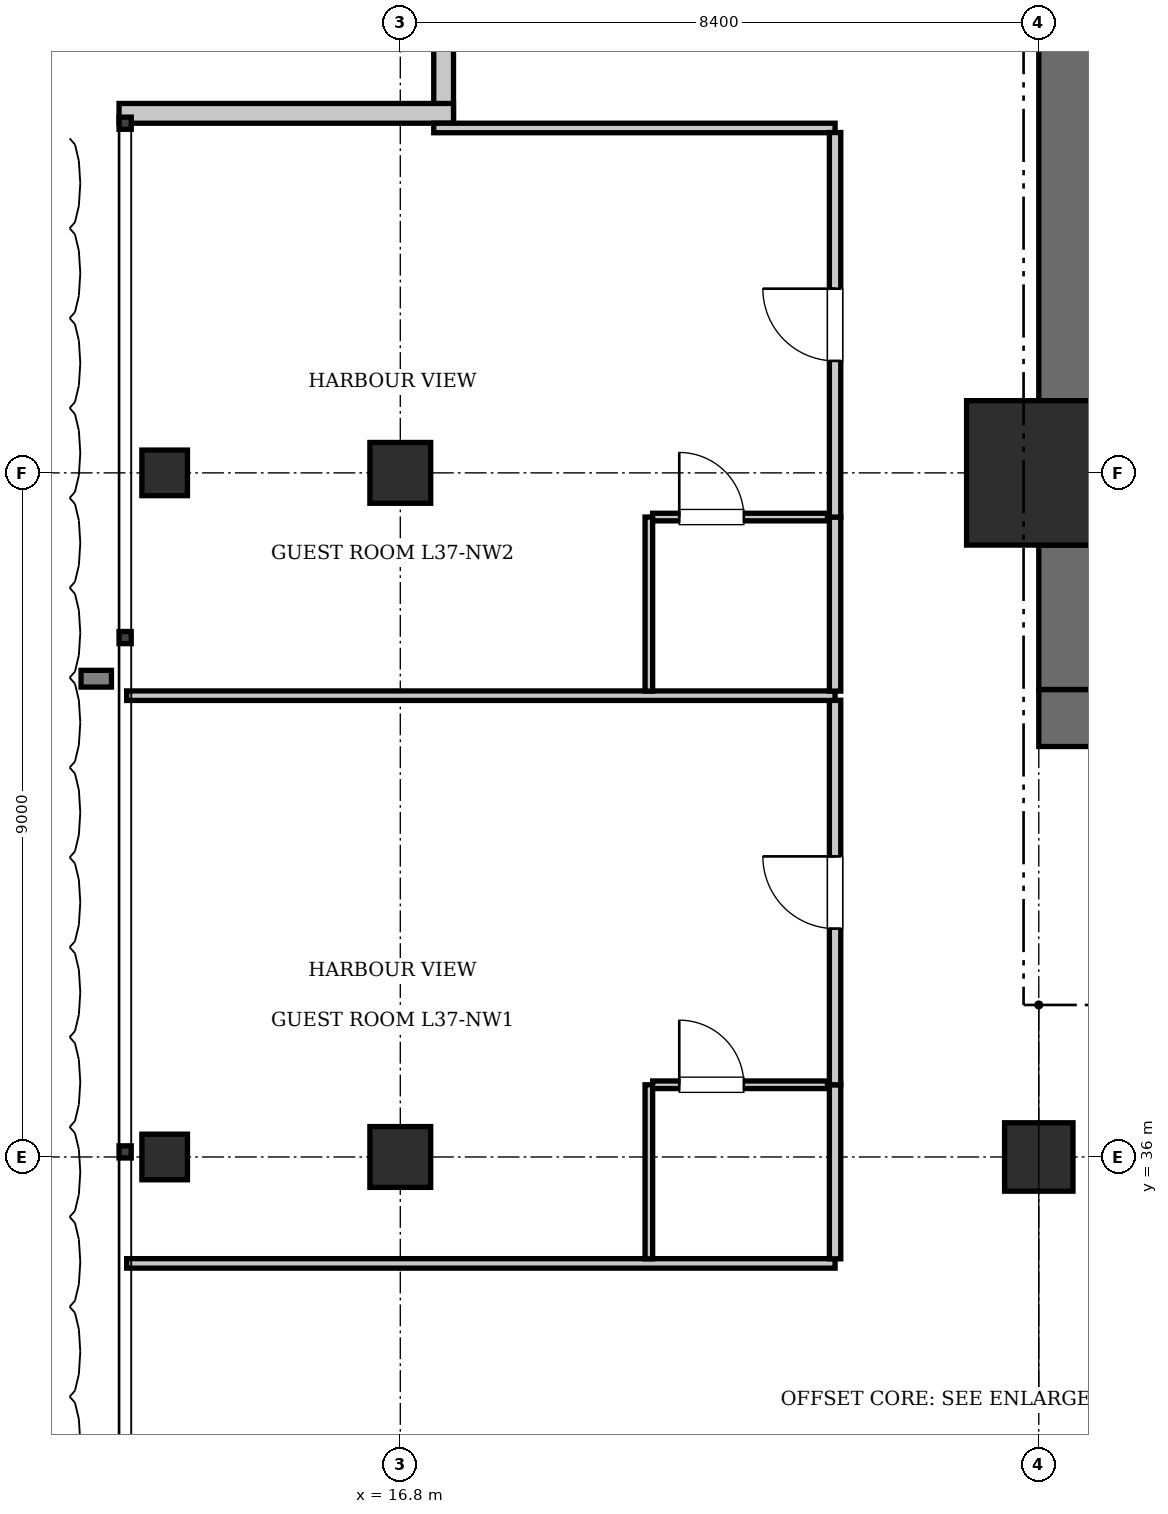
"""IFC4 building model, lengths in metres.
Left out: names, types, materials, properties, quantities, classifications, styles, units other than length and angle.
Written with IfcOpenShell. Run it as: python <this file> out.ifc"""

import sys

from ifc_helpers import new_model, si_unit, direction, frame, frame_2d, origin, origin_2d, place, context, subcontext, project, spatial, rectangle, i_section, extrude, element, fill, save


model = new_model("IFC4")
c1 = context("Model", 3, precision=1e-05, world=origin(), true_north=direction((0.0, 1.0)))
c2 = subcontext(c1, "Body", "Model", "MODEL_VIEW")
j1 = project(units=[si_unit("LENGTHUNIT", "METRE"), si_unit("PLANEANGLEUNIT", "RADIAN")], contexts=[c1])
p1 = place(None, origin())
s1 = spatial("IfcSite", under=j1, at=p1, CompositionType="ELEMENT")
p2 = place(p1, origin())
s2 = spatial("IfcBuilding", under=s1, at=p2, CompositionType="ELEMENT")
p3 = place(p2, frame((0.0, 0.0, 154.35)))
s3 = spatial("IfcBuildingStorey", under=s2, at=p3, CompositionType="ELEMENT", Elevation=154.35)
p4 = place(p3, frame((25.2, 45.0, 0.0), z_axis=(0.0, 0.0, 1.0), x_axis=(1.0, 0.0, 0.0)))
e1 = element("IfcColumn", 1, at=p4, inside=s3, PredefinedType="COLUMN", context=c2, shape_type="SweptSolid", body=[
    extrude(rectangle(XDim=1.9, YDim=1.9, at=origin_2d()), origin(), (0.0, 0.0, 1.0), 3.85),
])
p5 = place(p3, frame((25.2, 41.775, 0.0), z_axis=(0.0, 0.0, 1.0), x_axis=(1.0, 0.0, 0.0)))
e2 = element("IfcWall", 2, at=p5, inside=s3, PredefinedType="SHEAR", context=c2, shape_type="SweptSolid", body=[
    extrude(rectangle(XDim=6.8, YDim=0.75, at=frame_2d((3.4, 0.0))), origin(), (0.0, 0.0, 1.0), 3.85),
])
p6 = place(p5, frame((1.65, 0.0, 0.0)))
e3 = element("IfcOpeningElement", 3, at=p6, cuts=e2, PredefinedType="OPENING", context=c2, shape_type="SweptSolid", body=[
    extrude(rectangle(XDim=1.15, YDim=2.15, at=frame_2d((0.575, 1.075))), frame((0.0, 0.385, 0.0), z_axis=(0.0, -1.0, 0.0), x_axis=(1.0, 0.0, 0.0)), (0.0, 0.0, 1.0), 0.77),
])
p7 = place(p5, frame((5.15, 0.0, 0.0)))
e4 = element("IfcOpeningElement", 4, at=p7, cuts=e2, PredefinedType="OPENING", context=c2, shape_type="SweptSolid", body=[
    extrude(rectangle(XDim=1.1, YDim=2.2, at=frame_2d((0.55, 1.1))), frame((0.0, 0.385, 0.0), z_axis=(0.0, -1.0, 0.0), x_axis=(1.0, 0.0, 0.0)), (0.0, 0.0, 1.0), 0.77),
])
p8 = place(p3, frame((25.575, 42.15, 0.0), z_axis=(0.0, 0.0, 1.0), x_axis=(0.0, 1.0, 0.0)))
e5 = element("IfcWall", 5, at=p8, inside=s3, PredefinedType="SHEAR", context=c2, shape_type="SweptSolid", body=[
    extrude(rectangle(XDim=1.9, YDim=0.75, at=frame_2d((0.95, 0.0))), origin(), (0.0, 0.0, 1.0), 3.85),
])
p9 = place(p3, frame((25.575, 45.95, 0.0), z_axis=(0.0, 0.0, 1.0), x_axis=(0.0, 1.0, 0.0)))
e6 = element("IfcWall", 6, at=p9, inside=s3, PredefinedType="SHEAR", context=c2, shape_type="SweptSolid", body=[
    extrude(rectangle(XDim=7.3, YDim=0.75, at=frame_2d((3.65, 0.0))), origin(), (0.0, 0.0, 1.0), 3.85),
])
p10 = place(p3, frame((25.2, 36.0, 0.0), z_axis=(0.0, 0.0, 1.0), x_axis=(1.0, 0.0, 0.0)))
e7 = element("IfcColumn", 7, at=p10, inside=s3, PredefinedType="COLUMN", context=c2, shape_type="SweptSolid", body=[
    extrude(rectangle(XDim=0.9, YDim=0.9, at=origin_2d()), origin(), (0.0, 0.0, 1.0), 3.85),
])
for number, where, z_axis, x_axis in (
    (8, (16.8, 36.0, 0.0), (0.0, 0.0, 1.0), (1.0, 0.0, 0.0)),
    (9, (16.8, 45.0, 0.0), (0.0, 0.0, 1.0), (1.0, 0.0, 0.0)),
):
    element("IfcColumn", number, at=place(p3, frame(where, z_axis=z_axis, x_axis=x_axis)), inside=s3, PredefinedType="COLUMN", context=c2, shape_type="SweptSolid", body=[
        extrude(rectangle(XDim=0.8, YDim=0.8, at=origin_2d()), origin(), (0.0, 0.0, 1.0), 3.85),
    ])
for number, where, z_axis, x_axis in (
    (10, (13.7, 36.0, 0.0), (0.0, 0.0, 1.0), (1.0, 0.0, 0.0)),
    (11, (13.7, 45.0, 0.0), (0.0, 0.0, 1.0), (1.0, 0.0, 0.0)),
):
    element("IfcColumn", number, at=place(p3, frame(where, z_axis=z_axis, x_axis=x_axis)), inside=s3, PredefinedType="COLUMN", context=c2, shape_type="SweptSolid", body=[
        extrude(i_section(OverallWidth=0.6, OverallDepth=0.6, WebThickness=0.025, FlangeThickness=0.038, at=origin_2d()), origin(), (0.0, 0.0, 1.0), 3.85),
    ])
for number, where, z_axis, x_axis in (
    (12, (17.37, 49.6, 0.0), (0.0, 0.0, 1.0), (0.0, 1.0, 0.0)),
    (13, (13.1, 49.73, 0.0), (0.0, 0.0, 1.0), (1.0, 0.0, 0.0)),
):
    element("IfcWall", number, at=place(p3, frame(where, z_axis=z_axis, x_axis=x_axis)), inside=s3, PredefinedType="SOLIDWALL", context=c2, shape_type="SweptSolid", body=[
        extrude(rectangle(XDim=4.4, YDim=0.26, at=frame_2d((2.2, 0.0))), origin(), (0.0, 0.0, 1.0), 3.61),
    ])
p11 = place(p3, frame((13.2, 34.6, 0.0), z_axis=(0.0, 0.0, 1.0), x_axis=(1.0, 0.0, 0.0)))
e14 = element("IfcWall", 14, at=p11, inside=s3, PredefinedType="PARTITIONING", context=c2, shape_type="SweptSolid", body=[
    extrude(rectangle(XDim=9.32, YDim=0.125, at=frame_2d((4.66, 0.0))), origin(), (0.0, 0.0, 1.0), 3.61),
])
p12 = place(p3, frame((17.24, 49.538, 0.0), z_axis=(0.0, 0.0, 1.0), x_axis=(1.0, 0.0, 0.0)))
e15 = element("IfcWall", 15, at=p12, inside=s3, PredefinedType="PARTITIONING", context=c2, shape_type="SweptSolid", body=[
    extrude(rectangle(XDim=5.28, YDim=0.125, at=frame_2d((2.64, 0.0))), origin(), (0.0, 0.0, 1.0), 3.61),
])
p13 = place(p3, frame((22.52, 34.66, 0.0), z_axis=(0.0, 0.0, 1.0), x_axis=(0.0, 1.0, 0.0)))
e16 = element("IfcWall", 16, at=p13, inside=s3, PredefinedType="PARTITIONING", context=c2, shape_type="SweptSolid", body=[
    extrude(rectangle(XDim=2.29, YDim=0.15, at=frame_2d((1.145, 0.0))), origin(), (0.0, 0.0, 1.0), 3.61),
])
p14 = place(p3, frame((22.52, 36.95, 0.0), z_axis=(0.0, 0.0, 1.0), x_axis=(0.0, 1.0, 0.0)))
e17 = element("IfcWall", 17, at=p14, inside=s3, PredefinedType="PARTITIONING", context=c2, shape_type="SweptSolid", body=[
    extrude(rectangle(XDim=5.059, YDim=0.15, at=frame_2d((2.529, 0.0))), origin(), (0.0, 0.0, 1.0), 3.61),
])
p15 = place(p14, frame((2.054, 0.0, 0.0)))
e18 = element("IfcOpeningElement", 18, at=p15, cuts=e17, PredefinedType="OPENING", context=c2, shape_type="SweptSolid", body=[
    extrude(rectangle(XDim=0.95, YDim=2.15, at=frame_2d((0.475, 1.075))), frame((0.0, 0.085, 0.0), z_axis=(0.0, -1.0, 0.0), x_axis=(1.0, 0.0, 0.0)), (0.0, 0.0, 1.0), 0.17),
])
p16 = place(p3, frame((20.07, 34.66, 0.0), z_axis=(0.0, 0.0, 1.0), x_axis=(0.0, 1.0, 0.0)))
e19 = element("IfcWall", 19, at=p16, inside=s3, PredefinedType="PARTITIONING", context=c2, shape_type="SweptSolid", body=[
    extrude(rectangle(XDim=2.29, YDim=0.1, at=frame_2d((1.145, 0.0))), origin(), (0.0, 0.0, 1.0), 3.61),
])
p17 = place(p3, frame((20.12, 36.95, 0.0), z_axis=(0.0, 0.0, 1.0), x_axis=(1.0, 0.0, 0.0)))
e20 = element("IfcWall", 20, at=p17, inside=s3, PredefinedType="PARTITIONING", context=c2, shape_type="SweptSolid", body=[
    extrude(rectangle(XDim=2.3, YDim=0.1, at=frame_2d((1.15, 0.0))), origin(), (0.0, 0.0, 1.0), 3.61),
])
p18 = place(p17, frame((0.35, 0.0, 0.0)))
e21 = element("IfcOpeningElement", 21, at=p18, cuts=e20, PredefinedType="OPENING", context=c2, shape_type="SweptSolid", body=[
    extrude(rectangle(XDim=0.85, YDim=2.1, at=frame_2d((0.425, 1.05))), frame((0.0, 0.06, 0.0), z_axis=(0.0, -1.0, 0.0), x_axis=(1.0, 0.0, 0.0)), (0.0, 0.0, 1.0), 0.12),
])
p19 = place(p3, frame((13.2, 42.069, 0.0), z_axis=(0.0, 0.0, 1.0), x_axis=(1.0, 0.0, 0.0)))
e22 = element("IfcWall", 22, at=p19, inside=s3, PredefinedType="PARTITIONING", context=c2, shape_type="SweptSolid", body=[
    extrude(rectangle(XDim=9.32, YDim=0.125, at=frame_2d((4.66, 0.0))), origin(), (0.0, 0.0, 1.0), 3.61),
])
p20 = place(p3, frame((22.52, 42.129, 0.0), z_axis=(0.0, 0.0, 1.0), x_axis=(0.0, 1.0, 0.0)))
e23 = element("IfcWall", 23, at=p20, inside=s3, PredefinedType="PARTITIONING", context=c2, shape_type="SweptSolid", body=[
    extrude(rectangle(XDim=2.29, YDim=0.15, at=frame_2d((1.145, 0.0))), origin(), (0.0, 0.0, 1.0), 3.61),
])
p21 = place(p3, frame((22.52, 44.419, 0.0), z_axis=(0.0, 0.0, 1.0), x_axis=(0.0, 1.0, 0.0)))
e24 = element("IfcWall", 24, at=p21, inside=s3, PredefinedType="PARTITIONING", context=c2, shape_type="SweptSolid", body=[
    extrude(rectangle(XDim=5.059, YDim=0.15, at=frame_2d((2.529, 0.0))), origin(), (0.0, 0.0, 1.0), 3.61),
])
p22 = place(p21, frame((2.054, 0.0, 0.0)))
e25 = element("IfcOpeningElement", 25, at=p22, cuts=e24, PredefinedType="OPENING", context=c2, shape_type="SweptSolid", body=[
    extrude(rectangle(XDim=0.95, YDim=2.15, at=frame_2d((0.475, 1.075))), frame((0.0, 0.085, 0.0), z_axis=(0.0, -1.0, 0.0), x_axis=(1.0, 0.0, 0.0)), (0.0, 0.0, 1.0), 0.17),
])
p23 = place(p3, frame((20.07, 42.129, 0.0), z_axis=(0.0, 0.0, 1.0), x_axis=(0.0, 1.0, 0.0)))
e26 = element("IfcWall", 26, at=p23, inside=s3, PredefinedType="PARTITIONING", context=c2, shape_type="SweptSolid", body=[
    extrude(rectangle(XDim=2.29, YDim=0.1, at=frame_2d((1.145, 0.0))), origin(), (0.0, 0.0, 1.0), 3.61),
])
p24 = place(p3, frame((20.12, 44.419, 0.0), z_axis=(0.0, 0.0, 1.0), x_axis=(1.0, 0.0, 0.0)))
e27 = element("IfcWall", 27, at=p24, inside=s3, PredefinedType="PARTITIONING", context=c2, shape_type="SweptSolid", body=[
    extrude(rectangle(XDim=2.3, YDim=0.1, at=frame_2d((1.15, 0.0))), origin(), (0.0, 0.0, 1.0), 3.61),
])
p25 = place(p24, frame((0.35, 0.0, 0.0)))
e28 = element("IfcOpeningElement", 28, at=p25, cuts=e27, PredefinedType="OPENING", context=c2, shape_type="SweptSolid", body=[
    extrude(rectangle(XDim=0.85, YDim=2.1, at=frame_2d((0.425, 1.05))), frame((0.0, 0.06, 0.0), z_axis=(0.0, -1.0, 0.0), x_axis=(1.0, 0.0, 0.0)), (0.0, 0.0, 1.0), 0.12),
])
p26 = place(p18, origin())
e29 = element("IfcDoor", 29, at=p26, inside=s3, OperationType="SINGLE_SWING_LEFT", PredefinedType="DOOR", context=c2, shape_type="SweptSolid", body=[
    extrude(rectangle(XDim=0.85, YDim=2.1, at=frame_2d((0.425, 1.05))), frame((0.0, 0.025, 0.0), z_axis=(0.0, -1.0, 0.0), x_axis=(1.0, 0.0, 0.0)), (0.0, 0.0, 1.0), 0.05),
])
fill(e21, e29)
p27 = place(p15, origin())
e30 = element("IfcDoor", 30, at=p27, inside=s3, OperationType="SINGLE_SWING_RIGHT", PredefinedType="DOOR", context=c2, shape_type="SweptSolid", body=[
    extrude(rectangle(XDim=0.95, YDim=2.15, at=frame_2d((0.475, 1.075))), frame((0.0, 0.025, 0.0), z_axis=(0.0, -1.0, 0.0), x_axis=(1.0, 0.0, 0.0)), (0.0, 0.0, 1.0), 0.05),
])
fill(e18, e30)
p28 = place(p25, origin())
e31 = element("IfcDoor", 31, at=p28, inside=s3, OperationType="SINGLE_SWING_LEFT", PredefinedType="DOOR", context=c2, shape_type="SweptSolid", body=[
    extrude(rectangle(XDim=0.85, YDim=2.1, at=frame_2d((0.425, 1.05))), frame((0.0, 0.025, 0.0), z_axis=(0.0, -1.0, 0.0), x_axis=(1.0, 0.0, 0.0)), (0.0, 0.0, 1.0), 0.05),
])
fill(e28, e31)
p29 = place(p22, origin())
e32 = element("IfcDoor", 32, at=p29, inside=s3, OperationType="SINGLE_SWING_RIGHT", PredefinedType="DOOR", context=c2, shape_type="SweptSolid", body=[
    extrude(rectangle(XDim=0.95, YDim=2.15, at=frame_2d((0.475, 1.075))), frame((0.0, 0.025, 0.0), z_axis=(0.0, -1.0, 0.0), x_axis=(1.0, 0.0, 0.0)), (0.0, 0.0, 1.0), 0.05),
])
fill(e25, e32)
save(model, sys.argv[1])
